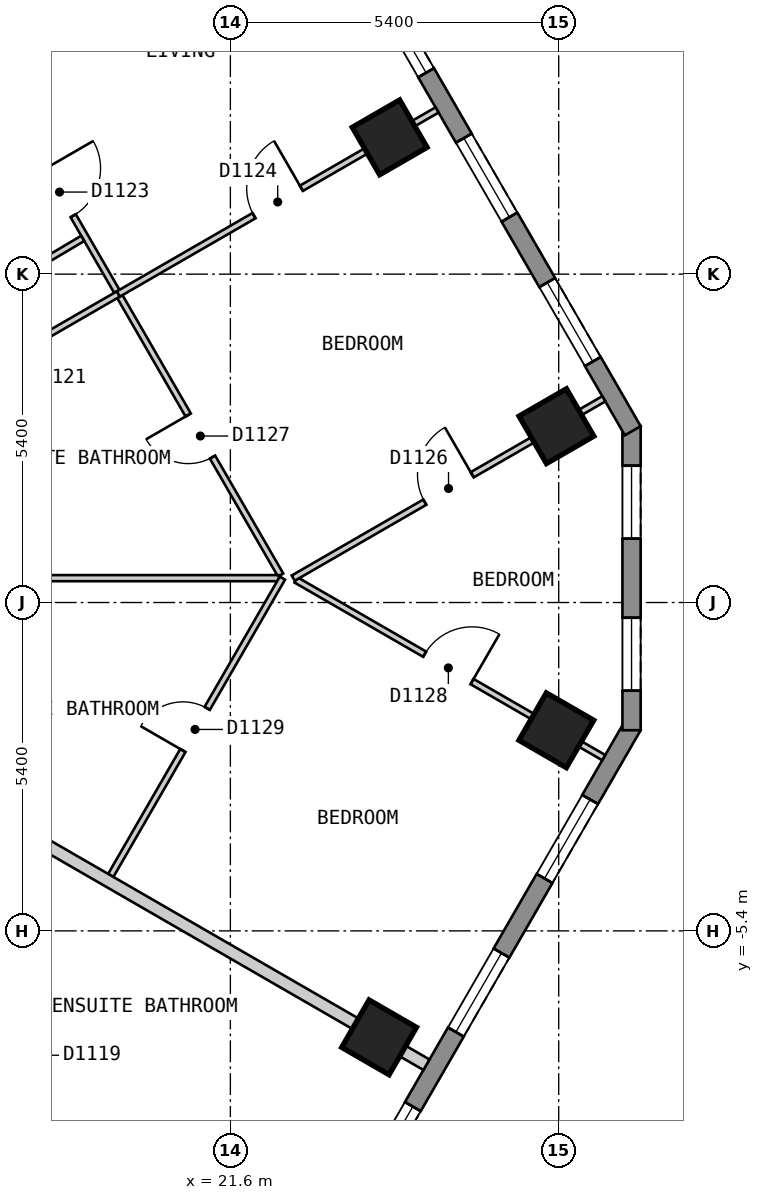
"""IFC4 building model, lengths in metres.
Left out: names, types, materials, properties, quantities, classifications, styles, units other than length and angle.
Written with IfcOpenShell. Run it as: python <this file> out.ifc"""

import sys

from ifc_helpers import new_model, si_unit, direction, frame, frame_2d, origin, origin_2d, place, context, subcontext, project, spatial, polyline, rectangle, outline, extrude, element, fill, save


model = new_model("IFC4")
c1 = context("Model", 3, precision=1e-05, world=origin(), true_north=direction((0.0, 1.0)))
c2 = subcontext(c1, "Body", "Model", "MODEL_VIEW")
j1 = project(units=[si_unit("LENGTHUNIT", "METRE"), si_unit("PLANEANGLEUNIT", "RADIAN")], contexts=[c1])
p1 = place(None, origin())
s1 = spatial("IfcSite", under=j1, at=p1, CompositionType="ELEMENT")
p2 = place(p1, origin())
s2 = spatial("IfcBuilding", under=s1, at=p2, CompositionType="ELEMENT")
p3 = place(p2, frame((0.0, 0.0, 144.6)))
s3 = spatial("IfcBuildingStorey", under=s2, at=p3, CompositionType="ELEMENT", Elevation=144.6)
for number, where, z_axis, x_axis in (
    (1, (24.046, -7.151, 0.0), (0.0, 0.0, 1.0), (0.5, 0.866, 0.0)),
    (2, (26.961, -2.101, 0.0), (0.0, 0.0, 1.0), (0.5, 0.866, 0.0)),
    (3, (26.963, 2.9, 0.0), (0.0, 0.0, 1.0), (-0.5, 0.866, 0.0)),
    (4, (24.22, 7.65, 0.0), (0.0, 0.0, 1.0), (-0.5, 0.866, 0.0)),
):
    element("IfcColumn", number, at=place(p3, frame(where, z_axis=z_axis, x_axis=x_axis)), inside=s3, PredefinedType="COLUMN", context=c2, shape_type="SweptSolid", body=[
        extrude(rectangle(XDim=0.9, YDim=0.9, at=origin_2d()), origin(), (0.0, 0.0, 1.0), 3.0),
    ])
p4 = place(p3, frame((15.862, -23.425, 0.0), z_axis=(0.0, 0.0, 1.0), x_axis=(0.500017503135, 0.866015298109, 0.0)))
e5 = element("IfcWall", 5, at=p4, inside=s3, PredefinedType="SOLIDWALL", context=c2, shape_type="SweptSolid", body=[
    extrude(outline(polyline([(0.0, -0.15), (24.711, -0.15), (24.631, 0.15), (0.08, 0.15), (0.0, -0.15)])), origin(), (0.0, 0.0, 1.0), 2.7),
])
p5 = place(p4, frame((1.4, 0.0, 0.15)))
e6 = element("IfcOpeningElement", 6, at=p5, cuts=e5, PredefinedType="OPENING", context=c2, shape_type="SweptSolid", body=[
    extrude(rectangle(XDim=1.5, YDim=2.1, at=frame_2d((0.75, 1.05))), frame((0.0, 0.16, 0.0), z_axis=(0.0, -1.0, 0.0), x_axis=(1.0, 0.0, 0.0)), (0.0, 0.0, 1.0), 0.32),
])
p6 = place(p4, frame((4.316, 0.0, 0.15)))
e7 = element("IfcOpeningElement", 7, at=p6, cuts=e5, PredefinedType="OPENING", context=c2, shape_type="SweptSolid", body=[
    extrude(rectangle(XDim=1.5, YDim=2.1, at=frame_2d((0.75, 1.05))), frame((0.0, 0.16, 0.0), z_axis=(0.0, -1.0, 0.0), x_axis=(1.0, 0.0, 0.0)), (0.0, 0.0, 1.0), 0.32),
])
p7 = place(p4, frame((7.231, 0.0, 0.15)))
e8 = element("IfcOpeningElement", 8, at=p7, cuts=e5, PredefinedType="OPENING", context=c2, shape_type="SweptSolid", body=[
    extrude(rectangle(XDim=1.5, YDim=2.1, at=frame_2d((0.75, 1.05))), frame((0.0, 0.16, 0.0), z_axis=(0.0, -1.0, 0.0), x_axis=(1.0, 0.0, 0.0)), (0.0, 0.0, 1.0), 0.32),
])
p8 = place(p4, frame((10.147, 0.0, 0.15)))
e9 = element("IfcOpeningElement", 9, at=p8, cuts=e5, PredefinedType="OPENING", context=c2, shape_type="SweptSolid", body=[
    extrude(rectangle(XDim=1.5, YDim=2.1, at=frame_2d((0.75, 1.05))), frame((0.0, 0.16, 0.0), z_axis=(0.0, -1.0, 0.0), x_axis=(1.0, 0.0, 0.0)), (0.0, 0.0, 1.0), 0.32),
])
p9 = place(p4, frame((13.062, 0.0, 0.15)))
e10 = element("IfcOpeningElement", 10, at=p9, cuts=e5, PredefinedType="OPENING", context=c2, shape_type="SweptSolid", body=[
    extrude(rectangle(XDim=1.5, YDim=2.1, at=frame_2d((0.75, 1.05))), frame((0.0, 0.16, 0.0), z_axis=(0.0, -1.0, 0.0), x_axis=(1.0, 0.0, 0.0)), (0.0, 0.0, 1.0), 0.32),
])
p10 = place(p4, frame((15.977, 0.0, 0.15)))
e11 = element("IfcOpeningElement", 11, at=p10, cuts=e5, PredefinedType="OPENING", context=c2, shape_type="SweptSolid", body=[
    extrude(rectangle(XDim=1.5, YDim=2.1, at=frame_2d((0.75, 1.05))), frame((0.0, 0.16, 0.0), z_axis=(0.0, -1.0, 0.0), x_axis=(1.0, 0.0, 0.0)), (0.0, 0.0, 1.0), 0.32),
])
p11 = place(p4, frame((18.893, 0.0, 0.15)))
e12 = element("IfcOpeningElement", 12, at=p11, cuts=e5, PredefinedType="OPENING", context=c2, shape_type="SweptSolid", body=[
    extrude(rectangle(XDim=1.5, YDim=2.1, at=frame_2d((0.75, 1.05))), frame((0.0, 0.16, 0.0), z_axis=(0.0, -1.0, 0.0), x_axis=(1.0, 0.0, 0.0)), (0.0, 0.0, 1.0), 0.32),
])
p12 = place(p4, frame((21.809, 0.0, 0.15)))
e13 = element("IfcOpeningElement", 13, at=p12, cuts=e5, PredefinedType="OPENING", context=c2, shape_type="SweptSolid", body=[
    extrude(rectangle(XDim=1.5, YDim=2.1, at=frame_2d((0.75, 1.05))), frame((0.0, 0.16, 0.0), z_axis=(0.0, -1.0, 0.0), x_axis=(1.0, 0.0, 0.0)), (0.0, 0.0, 1.0), 0.32),
])
p13 = place(p3, frame((28.198, -2.1, 0.0), z_axis=(0.0, 0.0, 1.0), x_axis=(0.0, 1.0, 0.0)))
e14 = element("IfcWall", 14, at=p13, inside=s3, PredefinedType="SOLIDWALL", context=c2, shape_type="SweptSolid", body=[
    extrude(outline(polyline([(0.0, -0.15), (5.0, -0.15), (4.92, 0.15), (0.08, 0.15), (0.0, -0.15)])), origin(), (0.0, 0.0, 1.0), 2.7),
])
p14 = place(p13, frame((0.65, 0.0, 0.15)))
e15 = element("IfcOpeningElement", 15, at=p14, cuts=e14, PredefinedType="OPENING", context=c2, shape_type="SweptSolid", body=[
    extrude(rectangle(XDim=1.2, YDim=2.1, at=frame_2d((0.6, 1.05))), frame((0.0, 0.16, 0.0), z_axis=(0.0, -1.0, 0.0), x_axis=(1.0, 0.0, 0.0)), (0.0, 0.0, 1.0), 0.32),
])
p15 = place(p13, frame((3.15, 0.0, 0.15)))
e16 = element("IfcOpeningElement", 16, at=p15, cuts=e14, PredefinedType="OPENING", context=c2, shape_type="SweptSolid", body=[
    extrude(rectangle(XDim=1.2, YDim=2.1, at=frame_2d((0.6, 1.05))), frame((0.0, 0.16, 0.0), z_axis=(0.0, -1.0, 0.0), x_axis=(1.0, 0.0, 0.0)), (0.0, 0.0, 1.0), 0.32),
])
p16 = place(p3, frame((28.218, 2.825, 0.0), z_axis=(0.0, 0.0, 1.0), x_axis=(-0.500020536353, 0.866013546791, 0.0)))
e17 = element("IfcWall", 17, at=p16, inside=s3, PredefinedType="SOLIDWALL", context=c2, shape_type="SweptSolid", body=[
    extrude(outline(polyline([(0.0, -0.15), (23.325, -0.15), (23.245, 0.15), (0.08, 0.15), (0.0, -0.15)])), origin(), (0.0, 0.0, 1.0), 2.7),
])
p17 = place(p16, frame((1.314, 0.0, 0.15)))
e18 = element("IfcOpeningElement", 18, at=p17, cuts=e17, PredefinedType="OPENING", context=c2, shape_type="SweptSolid", body=[
    extrude(rectangle(XDim=1.5, YDim=2.1, at=frame_2d((0.75, 1.05))), frame((0.0, 0.16, 0.0), z_axis=(0.0, -1.0, 0.0), x_axis=(1.0, 0.0, 0.0)), (0.0, 0.0, 1.0), 0.32),
])
p18 = place(p16, frame((4.056, 0.0, 0.15)))
e19 = element("IfcOpeningElement", 19, at=p18, cuts=e17, PredefinedType="OPENING", context=c2, shape_type="SweptSolid", body=[
    extrude(rectangle(XDim=1.5, YDim=2.1, at=frame_2d((0.75, 1.05))), frame((0.0, 0.16, 0.0), z_axis=(0.0, -1.0, 0.0), x_axis=(1.0, 0.0, 0.0)), (0.0, 0.0, 1.0), 0.32),
])
p19 = place(p16, frame((6.798, 0.0, 0.15)))
e20 = element("IfcOpeningElement", 20, at=p19, cuts=e17, PredefinedType="OPENING", context=c2, shape_type="SweptSolid", body=[
    extrude(rectangle(XDim=1.5, YDim=2.1, at=frame_2d((0.75, 1.05))), frame((0.0, 0.16, 0.0), z_axis=(0.0, -1.0, 0.0), x_axis=(1.0, 0.0, 0.0)), (0.0, 0.0, 1.0), 0.32),
])
p20 = place(p16, frame((9.541, 0.0, 0.15)))
e21 = element("IfcOpeningElement", 21, at=p20, cuts=e17, PredefinedType="OPENING", context=c2, shape_type="SweptSolid", body=[
    extrude(rectangle(XDim=1.5, YDim=2.1, at=frame_2d((0.75, 1.05))), frame((0.0, 0.16, 0.0), z_axis=(0.0, -1.0, 0.0), x_axis=(1.0, 0.0, 0.0)), (0.0, 0.0, 1.0), 0.32),
])
p21 = place(p16, frame((12.284, 0.0, 0.15)))
e22 = element("IfcOpeningElement", 22, at=p21, cuts=e17, PredefinedType="OPENING", context=c2, shape_type="SweptSolid", body=[
    extrude(rectangle(XDim=1.5, YDim=2.1, at=frame_2d((0.75, 1.05))), frame((0.0, 0.16, 0.0), z_axis=(0.0, -1.0, 0.0), x_axis=(1.0, 0.0, 0.0)), (0.0, 0.0, 1.0), 0.32),
])
p22 = place(p16, frame((15.027, 0.0, 0.15)))
e23 = element("IfcOpeningElement", 23, at=p22, cuts=e17, PredefinedType="OPENING", context=c2, shape_type="SweptSolid", body=[
    extrude(rectangle(XDim=1.5, YDim=2.1, at=frame_2d((0.75, 1.05))), frame((0.0, 0.16, 0.0), z_axis=(0.0, -1.0, 0.0), x_axis=(1.0, 0.0, 0.0)), (0.0, 0.0, 1.0), 0.32),
])
p23 = place(p16, frame((17.769, 0.0, 0.15)))
e24 = element("IfcOpeningElement", 24, at=p23, cuts=e17, PredefinedType="OPENING", context=c2, shape_type="SweptSolid", body=[
    extrude(rectangle(XDim=1.5, YDim=2.1, at=frame_2d((0.75, 1.05))), frame((0.0, 0.16, 0.0), z_axis=(0.0, -1.0, 0.0), x_axis=(1.0, 0.0, 0.0)), (0.0, 0.0, 1.0), 0.32),
])
p24 = place(p16, frame((20.511, 0.0, 0.15)))
e25 = element("IfcOpeningElement", 25, at=p24, cuts=e17, PredefinedType="OPENING", context=c2, shape_type="SweptSolid", body=[
    extrude(rectangle(XDim=1.5, YDim=2.1, at=frame_2d((0.75, 1.05))), frame((0.0, 0.16, 0.0), z_axis=(0.0, -1.0, 0.0), x_axis=(1.0, 0.0, 0.0)), (0.0, 0.0, 1.0), 0.32),
])
p25 = place(p3, frame((14.323, 14.487, 0.0), z_axis=(0.0, 0.0, 1.0), x_axis=(0.500011052545, -0.866019022501, 0.0)))
e26 = element("IfcWall", 26, at=p25, inside=s3, PredefinedType="PARTITIONING", context=c2, shape_type="SweptSolid", body=[
    extrude(rectangle(XDim=16.208, YDim=0.1, at=frame_2d((8.104, 0.0))), origin(), (0.0, 0.0, 1.0), 2.7),
])
p26 = place(p25, frame((8.484, 0.0, 0.0)))
e27 = element("IfcOpeningElement", 27, at=p26, cuts=e26, PredefinedType="OPENING", context=c2, shape_type="SweptSolid", body=[
    extrude(rectangle(XDim=0.9, YDim=2.1, at=frame_2d((0.45, 1.05))), frame((0.0, 0.06, 0.0), z_axis=(0.0, -1.0, 0.0), x_axis=(1.0, 0.0, 0.0)), (0.0, 0.0, 1.0), 0.12),
])
p27 = place(p25, frame((2.252, 0.0, 0.0)))
e28 = element("IfcOpeningElement", 28, at=p27, cuts=e26, PredefinedType="OPENING", context=c2, shape_type="SweptSolid", body=[
    extrude(rectangle(XDim=0.8, YDim=2.1, at=frame_2d((0.4, 1.05))), frame((0.0, 0.06, 0.0), z_axis=(0.0, -1.0, 0.0), x_axis=(1.0, 0.0, 0.0)), (0.0, 0.0, 1.0), 0.12),
])
p28 = place(p25, frame((13.167, 0.0, 0.0)))
e29 = element("IfcOpeningElement", 29, at=p28, cuts=e26, PredefinedType="OPENING", context=c2, shape_type="SweptSolid", body=[
    extrude(rectangle(XDim=0.8, YDim=2.1, at=frame_2d((0.4, 1.05))), frame((0.0, 0.06, 0.0), z_axis=(0.0, -1.0, 0.0), x_axis=(1.0, 0.0, 0.0)), (0.0, 0.0, 1.0), 0.12),
])
p29 = place(p3, frame((22.679, 0.372, 0.0), z_axis=(0.0, 0.0, 1.0), x_axis=(0.865985260119, -0.500069524424, 0.0)))
e30 = element("IfcWall", 30, at=p29, inside=s3, PredefinedType="PARTITIONING", context=c2, shape_type="SweptSolid", body=[
    extrude(rectangle(XDim=5.845, YDim=0.1, at=frame_2d((2.923, 0.0))), origin(), (0.0, 0.0, 1.0), 2.7),
])
p30 = place(p29, frame((2.444, 0.0, 0.0)))
e31 = element("IfcOpeningElement", 31, at=p30, cuts=e30, PredefinedType="OPENING", context=c2, shape_type="SweptSolid", body=[
    extrude(rectangle(XDim=0.9, YDim=2.1, at=frame_2d((0.45, 1.05))), frame((0.0, 0.06, 0.0), z_axis=(0.0, -1.0, 0.0), x_axis=(1.0, 0.0, 0.0)), (0.0, 0.0, 1.0), 0.12),
])
p31 = place(p3, frame((17.782, 0.401, 0.0), z_axis=(0.0, 0.0, 1.0), x_axis=(1.0, 0.0, 0.0)))
e32 = element("IfcWall", 32, at=p31, inside=s3, PredefinedType="PARTITIONING", context=c2, shape_type="SweptSolid", body=[
    extrude(rectangle(XDim=4.616, YDim=0.1, at=frame_2d((2.308, 0.0))), origin(), (0.0, 0.0, 1.0), 2.7),
])
p32 = place(p3, frame((19.633, -4.488, 0.0), z_axis=(0.0, 0.0, 1.0), x_axis=(0.500050624552, 0.865996173713, 0.0)))
e33 = element("IfcWall", 33, at=p32, inside=s3, PredefinedType="PARTITIONING", context=c2, shape_type="SweptSolid", body=[
    extrude(rectangle(XDim=5.646, YDim=0.1, at=frame_2d((2.823, 0.0))), origin(), (0.0, 0.0, 1.0), 2.7),
])
p33 = place(p32, frame((2.372, 0.0, 0.0)))
e34 = element("IfcOpeningElement", 34, at=p33, cuts=e33, PredefinedType="OPENING", context=c2, shape_type="SweptSolid", body=[
    extrude(rectangle(XDim=0.8, YDim=2.1, at=frame_2d((0.4, 1.05))), frame((0.0, 0.06, 0.0), z_axis=(0.0, -1.0, 0.0), x_axis=(1.0, 0.0, 0.0)), (0.0, 0.0, 1.0), 0.12),
])
p34 = place(p3, frame((16.339, 3.1, 0.0), z_axis=(0.0, 0.0, 1.0), x_axis=(0.866031112038, 0.499990112884, 0.0)))
e35 = element("IfcWall", 35, at=p34, inside=s3, PredefinedType="PARTITIONING", context=c2, shape_type="SweptSolid", body=[
    extrude(rectangle(XDim=3.948, YDim=0.1, at=frame_2d((1.974, 0.0))), origin(), (0.0, 0.0, 1.0), 2.7),
])
p35 = place(p3, frame((22.634, 0.401, 0.0), z_axis=(0.0, 0.0, 1.0), x_axis=(0.86601325737, 0.500021037617, 0.0)))
e36 = element("IfcWall", 36, at=p35, inside=s3, PredefinedType="PARTITIONING", context=c2, shape_type="SweptSolid", body=[
    extrude(rectangle(XDim=5.898, YDim=0.1, at=frame_2d((2.949, 0.0))), origin(), (0.0, 0.0, 1.0), 2.7),
])
p36 = place(p35, frame((2.499, 0.0, 0.0)))
e37 = element("IfcOpeningElement", 37, at=p36, cuts=e36, PredefinedType="OPENING", context=c2, shape_type="SweptSolid", body=[
    extrude(rectangle(XDim=0.9, YDim=2.1, at=frame_2d((0.45, 1.05))), frame((0.0, 0.06, 0.0), z_axis=(0.0, -1.0, 0.0), x_axis=(1.0, 0.0, 0.0)), (0.0, 0.0, 1.0), 0.12),
])
p37 = place(p3, frame((15.818, 4.002, 0.0), z_axis=(0.0, 0.0, 1.0), x_axis=(0.860457323494, 0.509522516132, 0.0)))
e38 = element("IfcWall", 38, at=p37, inside=s3, PredefinedType="PARTITIONING", context=c2, shape_type="SweptSolid", body=[
    extrude(rectangle(XDim=3.898, YDim=0.1, at=frame_2d((1.949, 0.0))), origin(), (0.0, 0.0, 1.0), 2.7),
])
p38 = place(p37, frame((1.524, 0.0, 0.0)))
e39 = element("IfcOpeningElement", 39, at=p38, cuts=e38, PredefinedType="OPENING", context=c2, shape_type="SweptSolid", body=[
    extrude(rectangle(XDim=0.8, YDim=2.1, at=frame_2d((0.4, 1.05))), frame((0.0, 0.06, 0.0), z_axis=(0.0, -1.0, 0.0), x_axis=(1.0, 0.0, 0.0)), (0.0, 0.0, 1.0), 0.12),
])
p39 = place(p3, frame((16.165, -2.601, 0.0), z_axis=(0.0, 0.0, 1.0), x_axis=(0.866016855193, -0.500014806302, 0.0)))
e40 = element("IfcWall", 40, at=p39, inside=s3, PredefinedType="PARTITIONING", context=c2, shape_type="SweptSolid", body=[
    extrude(rectangle(XDim=10.0, YDim=0.2, at=frame_2d((5.0, 0.0))), origin(), (0.0, 0.0, 1.0), 2.7),
])
p40 = place(p3, frame((19.758, 5.074, 0.0), z_axis=(0.0, 0.0, 1.0), x_axis=(0.866007554612, 0.500030914399, 0.0)))
e41 = element("IfcWall", 41, at=p40, inside=s3, PredefinedType="PARTITIONING", context=c2, shape_type="SweptSolid", body=[
    extrude(rectangle(XDim=6.052, YDim=0.1, at=frame_2d((3.026, 0.0))), origin(), (0.0, 0.0, 1.0), 2.7),
])
p41 = place(p40, frame((2.576, 0.0, 0.0)))
e42 = element("IfcOpeningElement", 42, at=p41, cuts=e41, PredefinedType="OPENING", context=c2, shape_type="SweptSolid", body=[
    extrude(rectangle(XDim=0.9, YDim=2.1, at=frame_2d((0.45, 1.05))), frame((0.0, 0.06, 0.0), z_axis=(0.0, -1.0, 0.0), x_axis=(1.0, 0.0, 0.0)), (0.0, 0.0, 1.0), 0.12),
])
p42 = place(p10, origin())
e43 = element("IfcWindow", 43, at=p42, inside=s3, PartitioningType="SINGLE_PANEL", PredefinedType="WINDOW", context=c2, shape_type="SweptSolid", body=[
    extrude(rectangle(XDim=1.5, YDim=2.1, at=frame_2d((0.75, 1.05))), frame((0.0, 0.03, 0.0), z_axis=(0.0, -1.0, 0.0), x_axis=(1.0, 0.0, 0.0)), (0.0, 0.0, 1.0), 0.06),
])
fill(e11, e43)
p43 = place(p11, origin())
e44 = element("IfcWindow", 44, at=p43, inside=s3, PartitioningType="SINGLE_PANEL", PredefinedType="WINDOW", context=c2, shape_type="SweptSolid", body=[
    extrude(rectangle(XDim=1.5, YDim=2.1, at=frame_2d((0.75, 1.05))), frame((0.0, 0.03, 0.0), z_axis=(0.0, -1.0, 0.0), x_axis=(1.0, 0.0, 0.0)), (0.0, 0.0, 1.0), 0.06),
])
fill(e12, e44)
p44 = place(p12, origin())
e45 = element("IfcWindow", 45, at=p44, inside=s3, PartitioningType="SINGLE_PANEL", PredefinedType="WINDOW", context=c2, shape_type="SweptSolid", body=[
    extrude(rectangle(XDim=1.5, YDim=2.1, at=frame_2d((0.75, 1.05))), frame((0.0, 0.03, 0.0), z_axis=(0.0, -1.0, 0.0), x_axis=(1.0, 0.0, 0.0)), (0.0, 0.0, 1.0), 0.06),
])
fill(e13, e45)
p45 = place(p14, origin())
e46 = element("IfcWindow", 46, at=p45, inside=s3, PartitioningType="SINGLE_PANEL", PredefinedType="WINDOW", context=c2, shape_type="SweptSolid", body=[
    extrude(rectangle(XDim=1.2, YDim=2.1, at=frame_2d((0.6, 1.05))), frame((0.0, 0.03, 0.0), z_axis=(0.0, -1.0, 0.0), x_axis=(1.0, 0.0, 0.0)), (0.0, 0.0, 1.0), 0.06),
])
fill(e15, e46)
p46 = place(p15, origin())
e47 = element("IfcWindow", 47, at=p46, inside=s3, PartitioningType="SINGLE_PANEL", PredefinedType="WINDOW", context=c2, shape_type="SweptSolid", body=[
    extrude(rectangle(XDim=1.2, YDim=2.1, at=frame_2d((0.6, 1.05))), frame((0.0, 0.03, 0.0), z_axis=(0.0, -1.0, 0.0), x_axis=(1.0, 0.0, 0.0)), (0.0, 0.0, 1.0), 0.06),
])
fill(e16, e47)
p47 = place(p17, origin())
e48 = element("IfcWindow", 48, at=p47, inside=s3, PartitioningType="SINGLE_PANEL", PredefinedType="WINDOW", context=c2, shape_type="SweptSolid", body=[
    extrude(rectangle(XDim=1.5, YDim=2.1, at=frame_2d((0.75, 1.05))), frame((0.0, 0.03, 0.0), z_axis=(0.0, -1.0, 0.0), x_axis=(1.0, 0.0, 0.0)), (0.0, 0.0, 1.0), 0.06),
])
fill(e18, e48)
p48 = place(p18, origin())
e49 = element("IfcWindow", 49, at=p48, inside=s3, PartitioningType="SINGLE_PANEL", PredefinedType="WINDOW", context=c2, shape_type="SweptSolid", body=[
    extrude(rectangle(XDim=1.5, YDim=2.1, at=frame_2d((0.75, 1.05))), frame((0.0, 0.03, 0.0), z_axis=(0.0, -1.0, 0.0), x_axis=(1.0, 0.0, 0.0)), (0.0, 0.0, 1.0), 0.06),
])
fill(e19, e49)
p49 = place(p19, origin())
e50 = element("IfcWindow", 50, at=p49, inside=s3, PartitioningType="SINGLE_PANEL", PredefinedType="WINDOW", context=c2, shape_type="SweptSolid", body=[
    extrude(rectangle(XDim=1.5, YDim=2.1, at=frame_2d((0.75, 1.05))), frame((0.0, 0.03, 0.0), z_axis=(0.0, -1.0, 0.0), x_axis=(1.0, 0.0, 0.0)), (0.0, 0.0, 1.0), 0.06),
])
fill(e20, e50)
p50 = place(p26, origin())
e51 = element("IfcDoor", 51, at=p50, inside=s3, OperationType="SINGLE_SWING_LEFT", PredefinedType="DOOR", context=c2, shape_type="SweptSolid", body=[
    extrude(rectangle(XDim=0.9, YDim=2.1, at=frame_2d((0.45, 1.05))), frame((0.0, 0.025, 0.0), z_axis=(0.0, -1.0, 0.0), x_axis=(1.0, 0.0, 0.0)), (0.0, 0.0, 1.0), 0.05),
])
fill(e27, e51)
p51 = place(p41, origin())
e52 = element("IfcDoor", 52, at=p51, inside=s3, OperationType="SINGLE_SWING_RIGHT", PredefinedType="DOOR", context=c2, shape_type="SweptSolid", body=[
    extrude(rectangle(XDim=0.9, YDim=2.1, at=frame_2d((0.45, 1.05))), frame((0.0, 0.025, 0.0), z_axis=(0.0, -1.0, 0.0), x_axis=(1.0, 0.0, 0.0)), (0.0, 0.0, 1.0), 0.05),
])
fill(e42, e52)
p52 = place(p36, origin())
e53 = element("IfcDoor", 53, at=p52, inside=s3, OperationType="SINGLE_SWING_RIGHT", PredefinedType="DOOR", context=c2, shape_type="SweptSolid", body=[
    extrude(rectangle(XDim=0.9, YDim=2.1, at=frame_2d((0.45, 1.05))), frame((0.0, 0.025, 0.0), z_axis=(0.0, -1.0, 0.0), x_axis=(1.0, 0.0, 0.0)), (0.0, 0.0, 1.0), 0.05),
])
fill(e37, e53)
p53 = place(p28, origin())
e54 = element("IfcDoor", 54, at=p53, inside=s3, OperationType="SINGLE_SWING_LEFT", PredefinedType="DOOR", context=c2, shape_type="SweptSolid", body=[
    extrude(rectangle(XDim=0.8, YDim=2.1, at=frame_2d((0.4, 1.05))), frame((0.0, 0.025, 0.0), z_axis=(0.0, -1.0, 0.0), x_axis=(1.0, 0.0, 0.0)), (0.0, 0.0, 1.0), 0.05),
])
fill(e29, e54)
p54 = place(p30, origin())
e55 = element("IfcDoor", 55, at=p54, inside=s3, OperationType="SINGLE_SWING_RIGHT", PredefinedType="DOOR", context=c2, shape_type="SweptSolid", body=[
    extrude(rectangle(XDim=0.9, YDim=2.1, at=frame_2d((0.45, 1.05))), frame((0.0, 0.025, 0.0), z_axis=(0.0, -1.0, 0.0), x_axis=(1.0, 0.0, 0.0)), (0.0, 0.0, 1.0), 0.05),
])
fill(e31, e55)
p55 = place(p33, origin())
e56 = element("IfcDoor", 56, at=p55, inside=s3, OperationType="SINGLE_SWING_LEFT", PredefinedType="DOOR", context=c2, shape_type="SweptSolid", body=[
    extrude(rectangle(XDim=0.8, YDim=2.1, at=frame_2d((0.4, 1.05))), frame((0.0, 0.025, 0.0), z_axis=(0.0, -1.0, 0.0), x_axis=(1.0, 0.0, 0.0)), (0.0, 0.0, 1.0), 0.05),
])
fill(e34, e56)
save(model, sys.argv[1])
